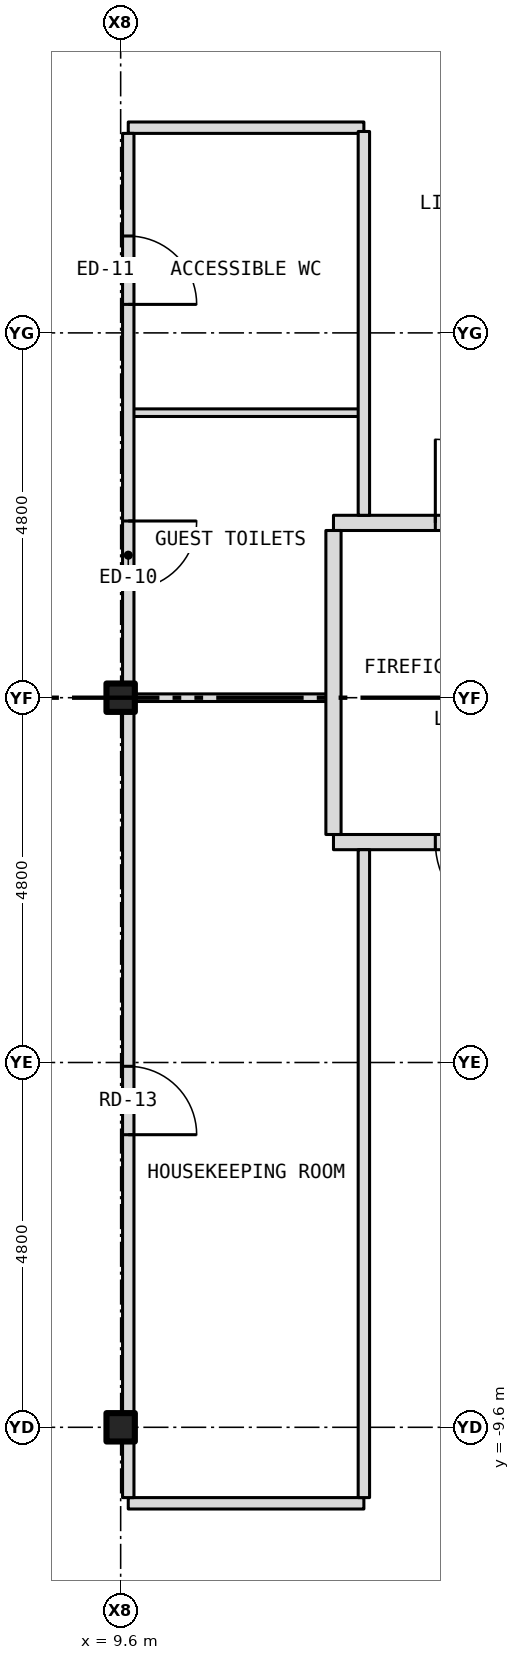
"""IFC4 building model, lengths in metres.
Left out: names, types, materials, properties, quantities, classifications, styles, units other than length and angle.
Written with IfcOpenShell. Run it as: python <this file> out.ifc"""

import sys

from ifc_helpers import new_model, si_unit, direction, frame, frame_2d, origin, origin_2d, place, context, subcontext, project, spatial, rectangle, i_section, extrude, element, fill, save


model = new_model("IFC4")
c1 = context("Model", 3, precision=1e-05, world=origin(), true_north=direction((0.0, 1.0)))
c2 = subcontext(c1, "Body", "Model", "MODEL_VIEW")
j1 = project(units=[si_unit("LENGTHUNIT", "METRE"), si_unit("PLANEANGLEUNIT", "RADIAN")], contexts=[c1])
p1 = place(None, origin())
s1 = spatial("IfcSite", under=j1, at=p1, CompositionType="ELEMENT")
p2 = place(p1, origin())
s2 = spatial("IfcBuilding", under=s1, at=p2, CompositionType="ELEMENT")
p3 = place(p2, frame((0.0, 0.0, 194.5)))
s3 = spatial("IfcBuildingStorey", under=s2, at=p3, CompositionType="ELEMENT", Elevation=194.5)
for number, where, z_axis, x_axis in (
    (1, (9.6, -9.6, -0.15), (0.0, 0.0, 1.0), (1.0, 0.0, 0.0)),
    (2, (9.6, 0.0, -0.15), (0.0, 0.0, 1.0), (1.0, 0.0, 0.0)),
):
    element("IfcColumn", number, at=place(p3, frame(where, z_axis=z_axis, x_axis=x_axis)), inside=s3, PredefinedType="COLUMN", context=c2, shape_type="SweptSolid", body=[
        extrude(i_section(OverallWidth=0.373, OverallDepth=0.373, WebThickness=0.016, FlangeThickness=0.026, at=origin_2d()), origin(), (0.0, 0.0, 1.0), 3.5),
    ])
p4 = place(p3, frame((9.7, -10.6, 0.0), z_axis=(0.0, 0.0, 1.0), x_axis=(1.0, 0.0, 0.0)))
e3 = element("IfcWall", 3, at=p4, inside=s3, PredefinedType="PARTITIONING", context=c2, shape_type="SweptSolid", body=[
    extrude(rectangle(XDim=3.1, YDim=0.15, at=frame_2d((1.55, 0.0))), origin(), (0.0, 0.0, 1.0), 3.35),
])
p5 = place(p3, frame((12.4, -1.9, 0.0), z_axis=(0.0, 0.0, 1.0), x_axis=(1.0, 0.0, 0.0)))
e4 = element("IfcWall", 4, at=p5, inside=s3, PredefinedType="PARTITIONING", context=c2, shape_type="SweptSolid", body=[
    extrude(rectangle(XDim=3.28, YDim=0.2, at=frame_2d((1.64, 0.0))), origin(), (0.0, 0.0, 1.0), 3.35),
])
p6 = place(p5, frame((1.34, 0.0, 0.0)))
e5 = element("IfcOpeningElement", 5, at=p6, cuts=e4, PredefinedType="OPENING", context=c2, shape_type="SweptSolid", body=[
    extrude(rectangle(XDim=1.1, YDim=2.1, at=frame_2d((0.55, 1.05))), frame((0.0, 0.112, 0.0), z_axis=(0.0, -1.0, 0.0), x_axis=(1.0, 0.0, 0.0)), (0.0, 0.0, 1.0), 0.224),
])
p7 = place(p3, frame((9.7, 0.0, 0.0), z_axis=(0.0, 0.0, 1.0), x_axis=(1.0, 0.0, 0.0)))
e6 = element("IfcWall", 6, at=p7, inside=s3, PredefinedType="PARTITIONING", context=c2, shape_type="SweptSolid", body=[
    extrude(rectangle(XDim=2.7, YDim=0.1, at=frame_2d((1.35, 0.0))), origin(), (0.0, 0.0, 1.0), 2.728),
])
p8 = place(p3, frame((12.4, 2.3, 0.0), z_axis=(0.0, 0.0, 1.0), x_axis=(1.0, 0.0, 0.0)))
e7 = element("IfcWall", 7, at=p8, inside=s3, PredefinedType="PARTITIONING", context=c2, shape_type="SweptSolid", body=[
    extrude(rectangle(XDim=3.28, YDim=0.2, at=frame_2d((1.64, 0.0))), origin(), (0.0, 0.0, 1.0), 3.35),
])
p9 = place(p8, frame((1.34, 0.0, 0.0)))
e8 = element("IfcOpeningElement", 8, at=p9, cuts=e7, PredefinedType="OPENING", context=c2, shape_type="SweptSolid", body=[
    extrude(rectangle(XDim=1.1, YDim=2.1, at=frame_2d((0.55, 1.05))), frame((0.0, 0.112, 0.0), z_axis=(0.0, -1.0, 0.0), x_axis=(1.0, 0.0, 0.0)), (0.0, 0.0, 1.0), 0.224),
])
p10 = place(p3, frame((9.7, 3.75, 0.0), z_axis=(0.0, 0.0, 1.0), x_axis=(1.0, 0.0, 0.0)))
e9 = element("IfcWall", 9, at=p10, inside=s3, PredefinedType="PARTITIONING", context=c2, shape_type="SweptSolid", body=[
    extrude(rectangle(XDim=3.1, YDim=0.1, at=frame_2d((1.55, 0.0))), origin(), (0.0, 0.0, 1.0), 3.35),
])
p11 = place(p3, frame((9.7, 7.5, 0.0), z_axis=(0.0, 0.0, 1.0), x_axis=(1.0, 0.0, 0.0)))
e10 = element("IfcWall", 10, at=p11, inside=s3, PredefinedType="PARTITIONING", context=c2, shape_type="SweptSolid", body=[
    extrude(rectangle(XDim=3.1, YDim=0.15, at=frame_2d((1.55, 0.0))), origin(), (0.0, 0.0, 1.0), 3.35),
])
p12 = place(p3, frame((9.7, -10.525, 0.0), z_axis=(0.0, 0.0, 1.0), x_axis=(0.0, 1.0, 0.0)))
e11 = element("IfcWall", 11, at=p12, inside=s3, PredefinedType="PARTITIONING", context=c2, shape_type="SweptSolid", body=[
    extrude(rectangle(XDim=0.738, YDim=0.15, at=frame_2d((0.369, 0.0))), origin(), (0.0, 0.0, 1.0), 2.728),
])
p13 = place(p3, frame((9.7, -9.787, 0.0), z_axis=(0.0, 0.0, 1.0), x_axis=(0.0, 1.0, 0.0)))
e12 = element("IfcWall", 12, at=p13, inside=s3, PredefinedType="PARTITIONING", context=c2, shape_type="SweptSolid", body=[
    extrude(rectangle(XDim=0.374, YDim=0.15, at=frame_2d((0.187, 0.0))), origin(), (0.0, 0.0, 1.0), 3.35),
])
p14 = place(p3, frame((9.7, -9.413, 0.0), z_axis=(0.0, 0.0, 1.0), x_axis=(0.0, 1.0, 0.0)))
e13 = element("IfcWall", 13, at=p14, inside=s3, PredefinedType="PARTITIONING", context=c2, shape_type="SweptSolid", body=[
    extrude(rectangle(XDim=9.226, YDim=0.15, at=frame_2d((4.613, 0.0))), origin(), (0.0, 0.0, 1.0), 2.728),
])
p15 = place(p14, frame((3.663, 0.0, 0.0)))
e14 = element("IfcOpeningElement", 14, at=p15, cuts=e13, PredefinedType="OPENING", context=c2, shape_type="SweptSolid", body=[
    extrude(rectangle(XDim=0.9, YDim=2.1, at=frame_2d((0.45, 1.05))), frame((0.0, 0.087, 0.0), z_axis=(0.0, -1.0, 0.0), x_axis=(1.0, 0.0, 0.0)), (0.0, 0.0, 1.0), 0.174),
])
p16 = place(p3, frame((9.7, -0.187, 0.0), z_axis=(0.0, 0.0, 1.0), x_axis=(0.0, 1.0, 0.0)))
e15 = element("IfcWall", 15, at=p16, inside=s3, PredefinedType="PARTITIONING", context=c2, shape_type="SweptSolid", body=[
    extrude(rectangle(XDim=0.374, YDim=0.15, at=frame_2d((0.187, 0.0))), origin(), (0.0, 0.0, 1.0), 3.35),
])
p17 = place(p3, frame((9.7, 0.187, 0.0), z_axis=(0.0, 0.0, 1.0), x_axis=(0.0, 1.0, 0.0)))
e16 = element("IfcWall", 16, at=p17, inside=s3, PredefinedType="PARTITIONING", context=c2, shape_type="SweptSolid", body=[
    extrude(rectangle(XDim=7.238, YDim=0.15, at=frame_2d((3.619, 0.0))), origin(), (0.0, 0.0, 1.0), 2.728),
])
p18 = place(p17, frame((1.238, 0.0, 0.0)))
e17 = element("IfcOpeningElement", 17, at=p18, cuts=e16, PredefinedType="OPENING", context=c2, shape_type="SweptSolid", body=[
    extrude(rectangle(XDim=0.9, YDim=2.1, at=frame_2d((0.45, 1.05))), frame((0.0, 0.087, 0.0), z_axis=(0.0, -1.0, 0.0), x_axis=(1.0, 0.0, 0.0)), (0.0, 0.0, 1.0), 0.174),
])
p19 = place(p17, frame((4.988, 0.0, 0.0)))
e18 = element("IfcOpeningElement", 18, at=p19, cuts=e16, PredefinedType="OPENING", context=c2, shape_type="SweptSolid", body=[
    extrude(rectangle(XDim=0.9, YDim=2.1, at=frame_2d((0.45, 1.05))), frame((0.0, 0.087, 0.0), z_axis=(0.0, -1.0, 0.0), x_axis=(1.0, 0.0, 0.0)), (0.0, 0.0, 1.0), 0.174),
])
p20 = place(p3, frame((12.4, -1.8, 0.0), z_axis=(0.0, 0.0, 1.0), x_axis=(0.0, 1.0, 0.0)))
e19 = element("IfcWall", 19, at=p20, inside=s3, PredefinedType="PARTITIONING", context=c2, shape_type="SweptSolid", body=[
    extrude(rectangle(XDim=4.0, YDim=0.2, at=frame_2d((2.0, 0.0))), origin(), (0.0, 0.0, 1.0), 3.35),
])
p21 = place(p3, frame((12.8, -10.525, 0.0), z_axis=(0.0, 0.0, 1.0), x_axis=(0.0, 1.0, 0.0)))
e20 = element("IfcWall", 20, at=p21, inside=s3, PredefinedType="PARTITIONING", context=c2, shape_type="SweptSolid", body=[
    extrude(rectangle(XDim=8.525, YDim=0.15, at=frame_2d((4.262, 0.0))), origin(), (0.0, 0.0, 1.0), 3.35),
])
p22 = place(p3, frame((12.8, 2.4, 0.0), z_axis=(0.0, 0.0, 1.0), x_axis=(0.0, 1.0, 0.0)))
e21 = element("IfcWall", 21, at=p22, inside=s3, PredefinedType="PARTITIONING", context=c2, shape_type="SweptSolid", body=[
    extrude(rectangle(XDim=5.05, YDim=0.15, at=frame_2d((2.525, 0.0))), origin(), (0.0, 0.0, 1.0), 3.35),
])
p23 = place(p9, origin())
e22 = element("IfcDoor", 22, at=p23, inside=s3, OperationType="SINGLE_SWING_LEFT", PredefinedType="DOOR", context=c2, shape_type="SweptSolid", body=[
    extrude(rectangle(XDim=1.1, YDim=2.1, at=frame_2d((0.55, 1.05))), frame((0.0, 0.025, 0.0), z_axis=(0.0, -1.0, 0.0), x_axis=(1.0, 0.0, 0.0)), (0.0, 0.0, 1.0), 0.05),
])
fill(e8, e22)
p24 = place(p6, origin())
e23 = element("IfcDoor", 23, at=p24, inside=s3, OperationType="SINGLE_SWING_RIGHT", PredefinedType="DOOR", context=c2, shape_type="SweptSolid", body=[
    extrude(rectangle(XDim=1.1, YDim=2.1, at=frame_2d((0.55, 1.05))), frame((0.0, 0.025, 0.0), z_axis=(0.0, -1.0, 0.0), x_axis=(1.0, 0.0, 0.0)), (0.0, 0.0, 1.0), 0.05),
])
fill(e5, e23)
p25 = place(p18, origin())
e24 = element("IfcDoor", 24, at=p25, inside=s3, OperationType="SINGLE_SWING_RIGHT", PredefinedType="DOOR", context=c2, shape_type="SweptSolid", body=[
    extrude(rectangle(XDim=0.9, YDim=2.1, at=frame_2d((0.45, 1.05))), frame((0.0, 0.025, 0.0), z_axis=(0.0, -1.0, 0.0), x_axis=(1.0, 0.0, 0.0)), (0.0, 0.0, 1.0), 0.05),
])
fill(e17, e24)
p26 = place(p19, origin())
e25 = element("IfcDoor", 25, at=p26, inside=s3, OperationType="SINGLE_SWING_LEFT", PredefinedType="DOOR", context=c2, shape_type="SweptSolid", body=[
    extrude(rectangle(XDim=0.9, YDim=2.1, at=frame_2d((0.45, 1.05))), frame((0.0, 0.025, 0.0), z_axis=(0.0, -1.0, 0.0), x_axis=(1.0, 0.0, 0.0)), (0.0, 0.0, 1.0), 0.05),
])
fill(e18, e25)
p27 = place(p15, origin())
e26 = element("IfcDoor", 26, at=p27, inside=s3, OperationType="SINGLE_SWING_LEFT", PredefinedType="DOOR", context=c2, shape_type="SweptSolid", body=[
    extrude(rectangle(XDim=0.9, YDim=2.1, at=frame_2d((0.45, 1.05))), frame((0.0, 0.025, 0.0), z_axis=(0.0, -1.0, 0.0), x_axis=(1.0, 0.0, 0.0)), (0.0, 0.0, 1.0), 0.05),
])
fill(e14, e26)
save(model, sys.argv[1])
